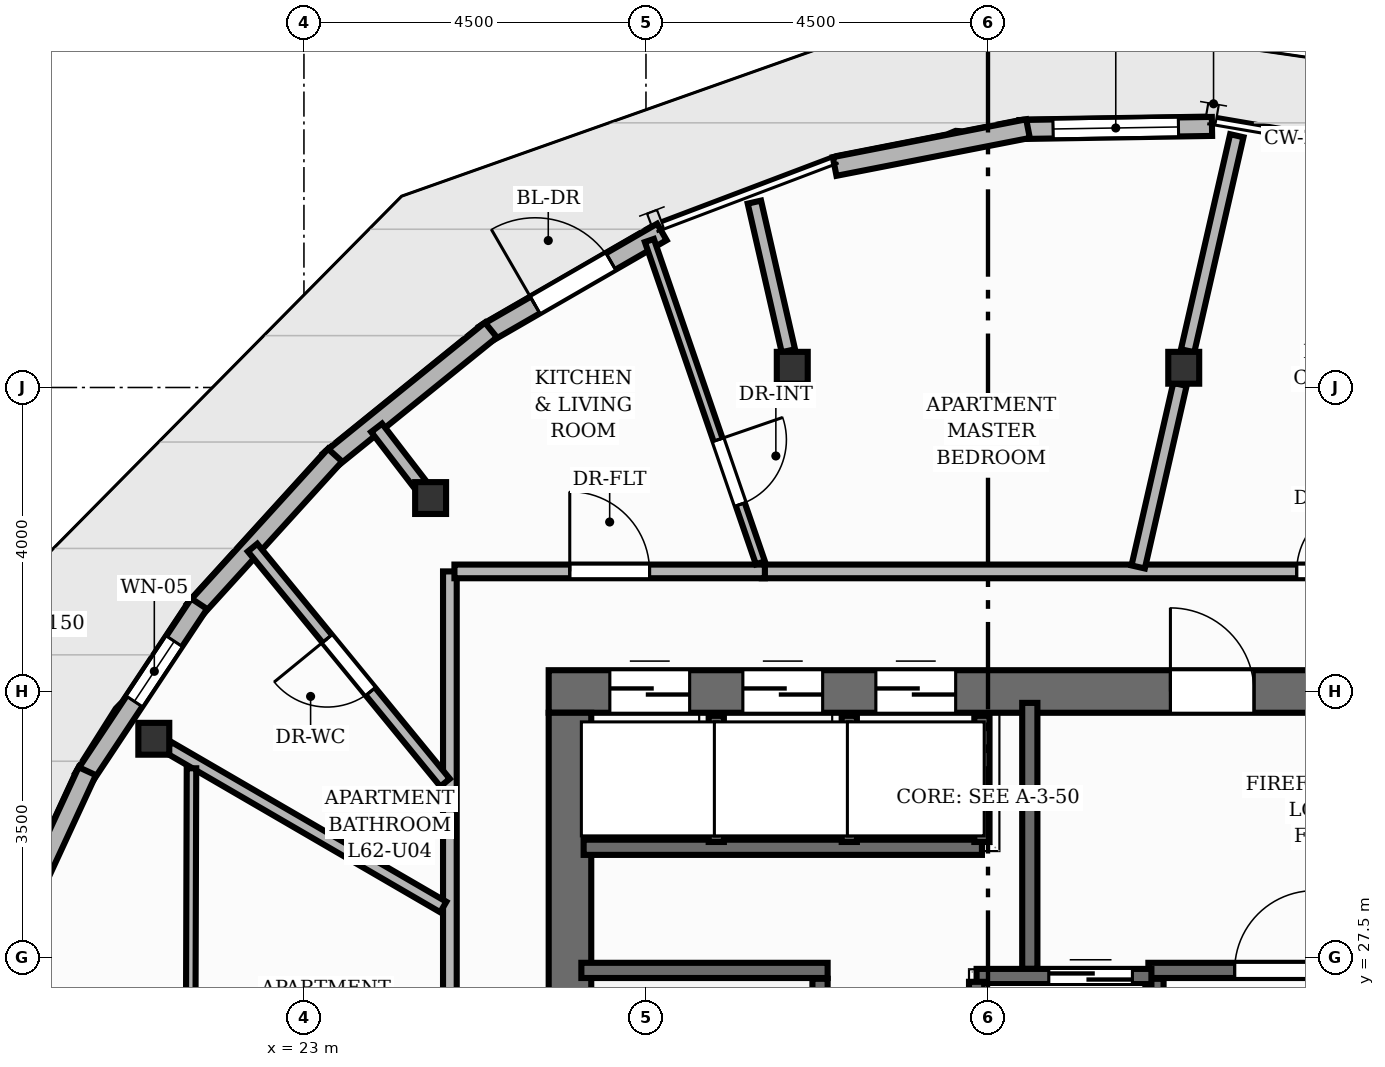
"""IFC4 building model, lengths in metres.
Left out: names, types, materials, properties, quantities, classifications, styles, units other than length and angle.
Written with IfcOpenShell. Run it as: python <this file> out.ifc"""

import sys

from ifc_helpers import new_model, si_unit, direction, frame, frame_2d, origin, origin_2d, place, context, subcontext, project, spatial, rectangle, i_section, extrude, element, fill, save


model = new_model("IFC4")
c1 = context("Model", 3, precision=1e-05, world=origin(), true_north=direction((0.0, 1.0)))
c2 = subcontext(c1, "Body", "Model", "MODEL_VIEW")
j1 = project(units=[si_unit("LENGTHUNIT", "METRE"), si_unit("PLANEANGLEUNIT", "RADIAN")], contexts=[c1])
p1 = place(None, origin())
s1 = spatial("IfcSite", under=j1, at=p1, CompositionType="ELEMENT")
p2 = place(p1, origin())
s2 = spatial("IfcBuilding", under=s1, at=p2, CompositionType="ELEMENT")
p3 = place(p2, frame((0.0, 0.0, 207.84)))
s3 = spatial("IfcBuildingStorey", under=s2, at=p3, CompositionType="ELEMENT", Elevation=207.84)
p4 = place(p3, frame((26.22, 31.0, 0.0), z_axis=(0.0, 0.0, 1.0), x_axis=(1.0, 0.0, 0.0)))
e1 = element("IfcWall", 1, at=p4, inside=s3, PredefinedType="SHEAR", context=c2, shape_type="SweptSolid", body=[
    extrude(rectangle(XDim=11.56, YDim=0.56, at=frame_2d((5.78, 0.0))), origin(), (0.0, 0.0, 1.0), 3.2),
])
p5 = place(p4, frame((8.18, 0.0, 0.0)))
e2 = element("IfcOpeningElement", 2, at=p5, cuts=e1, PredefinedType="OPENING", context=c2, shape_type="SweptSolid", body=[
    extrude(rectangle(XDim=1.1, YDim=2.15, at=frame_2d((0.55, 1.075))), frame((0.0, 0.29, 0.0), z_axis=(0.0, -1.0, 0.0), x_axis=(1.0, 0.0, 0.0)), (0.0, 0.0, 1.0), 0.58),
])
p6 = place(p4, frame((0.805, 0.0, 0.0)))
e3 = element("IfcOpeningElement", 3, at=p6, cuts=e1, PredefinedType="OPENING", context=c2, shape_type="SweptSolid", body=[
    extrude(rectangle(XDim=1.05, YDim=2.15, at=frame_2d((0.525, 1.075))), frame((0.0, 0.29, 0.0), z_axis=(0.0, -1.0, 0.0), x_axis=(1.0, 0.0, 0.0)), (0.0, 0.0, 1.0), 0.58),
])
p7 = place(p4, frame((2.555, 0.0, 0.0)))
e4 = element("IfcOpeningElement", 4, at=p7, cuts=e1, PredefinedType="OPENING", context=c2, shape_type="SweptSolid", body=[
    extrude(rectangle(XDim=1.05, YDim=2.15, at=frame_2d((0.525, 1.075))), frame((0.0, 0.29, 0.0), z_axis=(0.0, -1.0, 0.0), x_axis=(1.0, 0.0, 0.0)), (0.0, 0.0, 1.0), 0.58),
])
p8 = place(p4, frame((4.305, 0.0, 0.0)))
e5 = element("IfcOpeningElement", 5, at=p8, cuts=e1, PredefinedType="OPENING", context=c2, shape_type="SweptSolid", body=[
    extrude(rectangle(XDim=1.05, YDim=2.15, at=frame_2d((0.525, 1.075))), frame((0.0, 0.29, 0.0), z_axis=(0.0, -1.0, 0.0), x_axis=(1.0, 0.0, 0.0)), (0.0, 0.0, 1.0), 0.58),
])
p9 = place(p3, frame((26.5, 17.28, 0.0), z_axis=(0.0, 0.0, 1.0), x_axis=(0.0, 1.0, 0.0)))
e6 = element("IfcWall", 6, at=p9, inside=s3, PredefinedType="SHEAR", context=c2, shape_type="SweptSolid", body=[
    extrude(rectangle(XDim=13.44, YDim=0.56, at=frame_2d((6.72, 0.0))), origin(), (0.0, 0.0, 1.0), 3.2),
])
for number, where, z_axis, x_axis in (
    (7, (34.575, 35.26, 0.0), (0.0, 0.0, 1.0), (1.0, 0.0, 0.0)),
    (8, (29.425, 35.26, 0.0), (0.0, 0.0, 1.0), (1.0, 0.0, 0.0)),
    (9, (24.667, 33.545, 0.0), (0.0, 0.0, 1.0), (1.0, 0.0, 0.0)),
    (10, (21.025, 30.378, 0.0), (0.0, 0.0, 1.0), (1.0, 0.0, 0.0)),
):
    element("IfcColumn", number, at=place(p3, frame(where, z_axis=z_axis, x_axis=x_axis)), inside=s3, PredefinedType="COLUMN", context=c2, shape_type="SweptSolid", body=[
        extrude(i_section(OverallWidth=0.407, OverallDepth=0.419, WebThickness=0.031, FlangeThickness=0.049, at=origin_2d()), origin(), (0.0, 0.0, 1.0), 3.2),
    ])
p10 = place(p3, frame((32.415, 38.394, 0.0), z_axis=(0.0, 0.0, 1.0), x_axis=(0.999868796453, 0.016198453019, 0.0)))
e11 = element("IfcWall", 11, at=p10, inside=s3, PredefinedType="SOLIDWALL", context=c2, shape_type="SweptSolid", body=[
    extrude(rectangle(XDim=2.532, YDim=0.25, at=frame_2d((1.266, 0.0))), origin(), (0.0, 0.0, 1.0), 2.96),
])
p11 = place(p10, frame((0.441, 0.0, 0.85)))
e12 = element("IfcOpeningElement", 12, at=p11, cuts=e11, PredefinedType="OPENING", context=c2, shape_type="SweptSolid", body=[
    extrude(rectangle(XDim=1.65, YDim=1.55, at=frame_2d((0.825, 0.775))), frame((0.0, 0.135, 0.0), z_axis=(0.0, -1.0, 0.0), x_axis=(1.0, 0.0, 0.0)), (0.0, 0.0, 1.0), 0.27),
])
p12 = place(p3, frame((29.982, 37.908, 0.0), z_axis=(0.0, 0.0, 1.0), x_axis=(0.981387252987, 0.1920392139, 0.0)))
e13 = element("IfcWall", 13, at=p12, inside=s3, PredefinedType="SOLIDWALL", context=c2, shape_type="SweptSolid", body=[
    extrude(rectangle(XDim=2.592, YDim=0.25, at=frame_2d((1.296, 0.0))), origin(), (0.0, 0.0, 1.0), 2.96),
])
p13 = place(p3, frame((25.37, 35.695, 0.0), z_axis=(0.0, 0.0, 1.0), x_axis=(0.865914653104, 0.500191776762, 0.0)))
e14 = element("IfcWall", 14, at=p13, inside=s3, PredefinedType="SOLIDWALL", context=c2, shape_type="SweptSolid", body=[
    extrude(rectangle(XDim=2.702, YDim=0.25, at=frame_2d((1.351, 0.0))), origin(), (0.0, 0.0, 1.0), 2.96),
])
p14 = place(p13, frame((0.776, 0.0, 0.0)))
e15 = element("IfcOpeningElement", 15, at=p14, cuts=e14, PredefinedType="OPENING", context=c2, shape_type="SweptSolid", body=[
    extrude(rectangle(XDim=1.15, YDim=2.2, at=frame_2d((0.575, 1.1))), frame((0.0, 0.135, 0.0), z_axis=(0.0, -1.0, 0.0), x_axis=(1.0, 0.0, 0.0)), (0.0, 0.0, 1.0), 0.27),
])
p15 = place(p3, frame((23.33, 34.035, 0.0), z_axis=(0.0, 0.0, 1.0), x_axis=(0.777535429671, 0.628839133329, 0.0)))
e16 = element("IfcWall", 16, at=p15, inside=s3, PredefinedType="SOLIDWALL", context=c2, shape_type="SweptSolid", body=[
    extrude(rectangle(XDim=2.739, YDim=0.25, at=frame_2d((1.369, 0.0))), origin(), (0.0, 0.0, 1.0), 2.96),
])
p16 = place(p3, frame((21.554, 32.069, 0.0), z_axis=(0.0, 0.0, 1.0), x_axis=(0.672668387979, 0.739944078842, 0.0)))
e17 = element("IfcWall", 17, at=p16, inside=s3, PredefinedType="SOLIDWALL", context=c2, shape_type="SweptSolid", body=[
    extrude(rectangle(XDim=2.758, YDim=0.25, at=frame_2d((1.379, 0.0))), origin(), (0.0, 0.0, 1.0), 2.96),
])
p17 = place(p3, frame((20.096, 29.856, 0.0), z_axis=(0.0, 0.0, 1.0), x_axis=(0.553003487622, 0.83317893797, 0.0)))
e18 = element("IfcWall", 18, at=p17, inside=s3, PredefinedType="SOLIDWALL", context=c2, shape_type="SweptSolid", body=[
    extrude(rectangle(XDim=2.758, YDim=0.25, at=frame_2d((1.379, 0.0))), origin(), (0.0, 0.0, 1.0), 2.96),
])
p18 = place(p17, frame((1.216, 0.0, 0.85)))
e19 = element("IfcOpeningElement", 19, at=p18, cuts=e18, PredefinedType="OPENING", context=c2, shape_type="SweptSolid", body=[
    extrude(rectangle(XDim=0.95, YDim=1.45, at=frame_2d((0.475, 0.725))), frame((0.0, 0.135, 0.0), z_axis=(0.0, -1.0, 0.0), x_axis=(1.0, 0.0, 0.0)), (0.0, 0.0, 1.0), 0.27),
])
p19 = place(p3, frame((19.0, 27.466, 0.0), z_axis=(0.0, 0.0, 1.0), x_axis=(0.419544316157, 0.907734854889, 0.0)))
e20 = element("IfcWall", 20, at=p19, inside=s3, PredefinedType="SOLIDWALL", context=c2, shape_type="SweptSolid", body=[
    extrude(rectangle(XDim=2.739, YDim=0.25, at=frame_2d((1.369, 0.0))), origin(), (0.0, 0.0, 1.0), 2.96),
])
p20 = place(p3, frame((29.79, 20.78, 0.0), z_axis=(0.0, 0.0, 1.0), x_axis=(0.0, 1.0, 0.0)))
e21 = element("IfcWall", 21, at=p20, inside=s3, PredefinedType="SHEAR", context=c2, shape_type="SweptSolid", body=[
    extrude(rectangle(XDim=6.44, YDim=0.2, at=frame_2d((3.22, 0.0))), origin(), (0.0, 0.0, 1.0), 3.2),
])
p21 = place(p3, frame((26.65, 27.33, 0.0), z_axis=(0.0, 0.0, 1.0), x_axis=(1.0, 0.0, 0.0)))
e22 = element("IfcWall", 22, at=p21, inside=s3, PredefinedType="SHEAR", context=c2, shape_type="SweptSolid", body=[
    extrude(rectangle(XDim=3.24, YDim=0.2, at=frame_2d((1.62, 0.0))), origin(), (0.0, 0.0, 1.0), 3.2),
])
p22 = place(p3, frame((34.21, 20.78, 0.0), z_axis=(0.0, 0.0, 1.0), x_axis=(0.0, 1.0, 0.0)))
e23 = element("IfcWall", 23, at=p22, inside=s3, PredefinedType="SHEAR", context=c2, shape_type="SweptSolid", body=[
    extrude(rectangle(XDim=6.44, YDim=0.2, at=frame_2d((3.22, 0.0))), origin(), (0.0, 0.0, 1.0), 3.2),
])
p23 = place(p3, frame((34.11, 27.33, 0.0), z_axis=(0.0, 0.0, 1.0), x_axis=(1.0, 0.0, 0.0)))
e24 = element("IfcWall", 24, at=p23, inside=s3, PredefinedType="SHEAR", context=c2, shape_type="SweptSolid", body=[
    extrude(rectangle(XDim=3.24, YDim=0.2, at=frame_2d((1.62, 0.0))), origin(), (0.0, 0.0, 1.0), 3.2),
])
p24 = place(p23, frame((1.135, 0.0, 0.0)))
e25 = element("IfcOpeningElement", 25, at=p24, cuts=e24, PredefinedType="OPENING", context=c2, shape_type="SweptSolid", body=[
    extrude(rectangle(XDim=1.05, YDim=2.15, at=frame_2d((0.525, 1.075))), frame((0.0, 0.11, 0.0), z_axis=(0.0, -1.0, 0.0), x_axis=(1.0, 0.0, 0.0)), (0.0, 0.0, 1.0), 0.22),
])
p25 = place(p3, frame((32.55, 27.35, 0.0), z_axis=(0.0, 0.0, 1.0), x_axis=(0.0, 1.0, 0.0)))
e26 = element("IfcWall", 26, at=p25, inside=s3, PredefinedType="SHEAR", context=c2, shape_type="SweptSolid", body=[
    extrude(rectangle(XDim=3.5, YDim=0.2, at=frame_2d((1.75, 0.0))), origin(), (0.0, 0.0, 1.0), 3.2),
])
p26 = place(p3, frame((31.85, 27.25, 0.0), z_axis=(0.0, 0.0, 1.0), x_axis=(1.0, 0.0, 0.0)))
e27 = element("IfcWall", 27, at=p26, inside=s3, PredefinedType="SHEAR", context=c2, shape_type="SweptSolid", body=[
    extrude(rectangle(XDim=2.3, YDim=0.2, at=frame_2d((1.15, 0.0))), origin(), (0.0, 0.0, 1.0), 3.2),
])
p27 = place(p26, frame((0.95, 0.0, 0.0)))
e28 = element("IfcOpeningElement", 28, at=p27, cuts=e27, PredefinedType="OPENING", context=c2, shape_type="SweptSolid", body=[
    extrude(rectangle(XDim=1.1, YDim=2.15, at=frame_2d((0.55, 1.075))), frame((0.0, 0.11, 0.0), z_axis=(0.0, -1.0, 0.0), x_axis=(1.0, 0.0, 0.0)), (0.0, 0.0, 1.0), 0.22),
])
p28 = place(p3, frame((31.85, 25.47, 0.0), z_axis=(0.0, 0.0, 1.0), x_axis=(0.0, 1.0, 0.0)))
e29 = element("IfcWall", 29, at=p28, inside=s3, PredefinedType="SHEAR", context=c2, shape_type="SweptSolid", body=[
    extrude(rectangle(XDim=1.71, YDim=0.2, at=frame_2d((0.855, 0.0))), origin(), (0.0, 0.0, 1.0), 3.2),
])
p29 = place(p3, frame((26.68, 28.95, 0.0), z_axis=(0.0, 0.0, 1.0), x_axis=(1.0, 0.0, 0.0)))
e30 = element("IfcWall", 30, at=p29, inside=s3, PredefinedType="SHEAR", context=c2, shape_type="SweptSolid", body=[
    extrude(rectangle(XDim=5.24, YDim=0.2, at=frame_2d((2.62, 0.0))), origin(), (0.0, 0.0, 1.0), 3.2),
])
for number, where, z_axis, x_axis in (
    (31, (31.92, 29.02, 0.0), (0.0, 0.0, 1.0), (0.0, 1.0, 0.0)),
    (32, (28.425, 29.02, 0.0), (0.0, 0.0, 1.0), (0.0, 1.0, 0.0)),
    (33, (30.175, 29.02, 0.0), (0.0, 0.0, 1.0), (0.0, 1.0, 0.0)),
):
    element("IfcWall", number, at=place(p3, frame(where, z_axis=z_axis, x_axis=x_axis)), inside=s3, PredefinedType="SHEAR", context=c2, shape_type="SweptSolid", body=[
        extrude(rectangle(XDim=1.66, YDim=0.2, at=frame_2d((0.83, 0.0))), origin(), (0.0, 0.0, 1.0), 3.2),
    ])
p30 = place(p3, frame((34.626, 35.483, 0.0), z_axis=(0.0, 0.0, 1.0), x_axis=(0.22289331625, 0.974842843525, 0.0)))
e34 = element("IfcWall", 34, at=p30, inside=s3, PredefinedType="PARTITIONING", context=c2, shape_type="SweptSolid", body=[
    extrude(rectangle(XDim=2.903, YDim=0.18, at=frame_2d((1.451, 0.0))), origin(), (0.0, 0.0, 1.0), 2.403),
])
p31 = place(p3, frame((29.374, 35.483, 0.0), z_axis=(0.0, 0.0, 1.0), x_axis=(-0.222930532859, 0.974834333371, 0.0)))
e35 = element("IfcWall", 35, at=p31, inside=s3, PredefinedType="PARTITIONING", context=c2, shape_type="SweptSolid", body=[
    extrude(rectangle(XDim=2.006, YDim=0.18, at=frame_2d((1.003, 0.0))), origin(), (0.0, 0.0, 1.0), 2.403),
])
p32 = place(p3, frame((24.527, 33.727, 0.0), z_axis=(0.0, 0.0, 1.0), x_axis=(-0.609219316709, 0.793001780672, 0.0)))
e36 = element("IfcWall", 36, at=p32, inside=s3, PredefinedType="PARTITIONING", context=c2, shape_type="SweptSolid", body=[
    extrude(rectangle(XDim=0.937, YDim=0.18, at=frame_2d((0.468, 0.0))), origin(), (0.0, 0.0, 1.0), 2.403),
])
p33 = place(p3, frame((29.023, 32.58, 0.0), z_axis=(0.0, 0.0, 1.0), x_axis=(1.0, 0.0, 0.0)))
e37 = element("IfcWall", 37, at=p33, inside=s3, PredefinedType="PARTITIONING", context=c2, shape_type="SweptSolid", body=[
    extrude(rectangle(XDim=10.057, YDim=0.18, at=frame_2d((5.028, 0.0))), origin(), (0.0, 0.0, 1.0), 2.955),
])
p34 = place(p33, frame((7.038, 0.0, 0.0)))
e38 = element("IfcOpeningElement", 38, at=p34, cuts=e37, PredefinedType="OPENING", context=c2, shape_type="SweptSolid", body=[
    extrude(rectangle(XDim=0.9, YDim=2.1, at=frame_2d((0.45, 1.05))), frame((0.0, 0.1, 0.0), z_axis=(0.0, -1.0, 0.0), x_axis=(1.0, 0.0, 0.0)), (0.0, 0.0, 1.0), 0.2),
])
p35 = place(p3, frame((24.92, 20.574, 0.0), z_axis=(0.0, 0.0, 1.0), x_axis=(0.0, 1.0, 0.0)))
e39 = element("IfcWall", 39, at=p35, inside=s3, PredefinedType="PARTITIONING", context=c2, shape_type="SweptSolid", body=[
    extrude(rectangle(XDim=12.006, YDim=0.18, at=frame_2d((6.003, 0.0))), origin(), (0.0, 0.0, 1.0), 2.955),
])
p36 = place(p3, frame((24.98, 32.58, 0.0), z_axis=(0.0, 0.0, 1.0), x_axis=(1.0, 0.0, 0.0)))
e40 = element("IfcWall", 40, at=p36, inside=s3, PredefinedType="PARTITIONING", context=c2, shape_type="SweptSolid", body=[
    extrude(rectangle(XDim=4.085, YDim=0.18, at=frame_2d((2.042, 0.0))), origin(), (0.0, 0.0, 1.0), 2.955),
])
p37 = place(p36, frame((1.517, 0.0, 0.0)))
e41 = element("IfcOpeningElement", 41, at=p37, cuts=e40, PredefinedType="OPENING", context=c2, shape_type="SweptSolid", body=[
    extrude(rectangle(XDim=1.05, YDim=2.15, at=frame_2d((0.525, 1.075))), frame((0.0, 0.1, 0.0), z_axis=(0.0, -1.0, 0.0), x_axis=(1.0, 0.0, 0.0)), (0.0, 0.0, 1.0), 0.2),
])
p38 = place(p3, frame((33.976, 32.638, 0.0), z_axis=(0.0, 0.0, 1.0), x_axis=(0.222927030412, 0.974835134323, 0.0)))
e42 = element("IfcWall", 42, at=p38, inside=s3, PredefinedType="PARTITIONING", context=c2, shape_type="SweptSolid", body=[
    extrude(rectangle(XDim=2.464, YDim=0.18, at=frame_2d((1.232, 0.0))), origin(), (0.0, 0.0, 1.0), 2.403),
])
p39 = place(p3, frame((24.857, 29.801, 0.0), z_axis=(0.0, 0.0, 1.0), x_axis=(-0.63363022253, 0.773636052092, 0.0)))
e43 = element("IfcWall", 43, at=p39, inside=s3, PredefinedType="PLUMBINGWALL", context=c2, shape_type="SweptSolid", body=[
    extrude(rectangle(XDim=3.997, YDim=0.16, at=frame_2d((1.999, 0.0))), origin(), (0.0, 0.0, 1.0), 2.955),
])
p40 = place(p39, frame((1.548, 0.0, 0.0)))
e44 = element("IfcOpeningElement", 44, at=p40, cuts=e43, PredefinedType="OPENING", context=c2, shape_type="SweptSolid", body=[
    extrude(rectangle(XDim=0.9, YDim=2.1, at=frame_2d((0.45, 1.05))), frame((0.0, 0.09, 0.0), z_axis=(0.0, -1.0, 0.0), x_axis=(1.0, 0.0, 0.0)), (0.0, 0.0, 1.0), 0.18),
])
p41 = place(p3, frame((27.545, 36.934, 0.0), z_axis=(0.0, 0.0, 1.0), x_axis=(0.325683667498, -0.945478793377, 0.0)))
e45 = element("IfcWall", 45, at=p41, inside=s3, PredefinedType="PARTITIONING", context=c2, shape_type="SweptSolid", body=[
    extrude(rectangle(XDim=4.485, YDim=0.125, at=frame_2d((2.243, 0.0))), origin(), (0.0, 0.0, 1.0), 2.955),
])
p42 = place(p41, frame((2.773, 0.0, 0.0)))
e46 = element("IfcOpeningElement", 46, at=p42, cuts=e45, PredefinedType="OPENING", context=c2, shape_type="SweptSolid", body=[
    extrude(rectangle(XDim=0.9, YDim=2.1, at=frame_2d((0.45, 1.05))), frame((0.0, 0.073, 0.0), z_axis=(0.0, -1.0, 0.0), x_axis=(1.0, 0.0, 0.0)), (0.0, 0.0, 1.0), 0.145),
])
p43 = place(p3, frame((24.833, 28.164, 0.0), z_axis=(0.0, 0.0, 1.0), x_axis=(-0.864609810713, 0.502443902559, 0.0)))
e47 = element("IfcWall", 47, at=p43, inside=s3, PredefinedType="PLUMBINGWALL", context=c2, shape_type="SweptSolid", body=[
    extrude(rectangle(XDim=4.182, YDim=0.16, at=frame_2d((2.091, 0.0))), origin(), (0.0, 0.0, 1.0), 2.403),
])
p44 = place(p3, frame((21.487, 19.045, 0.0), z_axis=(0.0, 0.0, 1.0), x_axis=(0.003056179539, 0.999995329872, 0.0)))
e48 = element("IfcWall", 48, at=p44, inside=s3, PredefinedType="PARTITIONING", context=c2, shape_type="SweptSolid", body=[
    extrude(rectangle(XDim=10.944, YDim=0.125, at=frame_2d((5.472, 0.0))), origin(), (0.0, 0.0, 1.0), 2.955),
])
p45 = place(p44, frame((5.022, 0.0, 0.0)))
e49 = element("IfcOpeningElement", 49, at=p45, cuts=e48, PredefinedType="OPENING", context=c2, shape_type="SweptSolid", body=[
    extrude(rectangle(XDim=0.9, YDim=2.1, at=frame_2d((0.45, 1.05))), frame((0.0, 0.073, 0.0), z_axis=(0.0, -1.0, 0.0), x_axis=(1.0, 0.0, 0.0)), (0.0, 0.0, 1.0), 0.145),
])
p46 = place(p14, origin())
e50 = element("IfcDoor", 50, at=p46, inside=s3, OperationType="SINGLE_SWING_LEFT", PredefinedType="DOOR", context=c2, shape_type="SweptSolid", body=[
    extrude(rectangle(XDim=1.15, YDim=2.2, at=frame_2d((0.575, 1.1))), frame((0.0, 0.025, 0.0), z_axis=(0.0, -1.0, 0.0), x_axis=(1.0, 0.0, 0.0)), (0.0, 0.0, 1.0), 0.05),
])
fill(e15, e50)
p47 = place(p11, origin())
e51 = element("IfcWindow", 51, at=p47, inside=s3, PartitioningType="SINGLE_PANEL", PredefinedType="WINDOW", context=c2, shape_type="SweptSolid", body=[
    extrude(rectangle(XDim=1.65, YDim=1.55, at=frame_2d((0.825, 0.775))), frame((0.0, 0.03, 0.0), z_axis=(0.0, -1.0, 0.0), x_axis=(1.0, 0.0, 0.0)), (0.0, 0.0, 1.0), 0.06),
])
fill(e12, e51)
p48 = place(p18, origin())
e52 = element("IfcWindow", 52, at=p48, inside=s3, PartitioningType="SINGLE_PANEL", PredefinedType="WINDOW", context=c2, shape_type="SweptSolid", body=[
    extrude(rectangle(XDim=0.95, YDim=1.45, at=frame_2d((0.475, 0.725))), frame((0.0, 0.03, 0.0), z_axis=(0.0, -1.0, 0.0), x_axis=(1.0, 0.0, 0.0)), (0.0, 0.0, 1.0), 0.06),
])
fill(e19, e52)
p49 = place(p24, origin())
e53 = element("IfcDoor", 53, at=p49, inside=s3, OperationType="SINGLE_SWING_RIGHT", PredefinedType="DOOR", context=c2, shape_type="SweptSolid", body=[
    extrude(rectangle(XDim=1.05, YDim=2.15, at=frame_2d((0.525, 1.075))), frame((0.0, 0.025, 0.0), z_axis=(0.0, -1.0, 0.0), x_axis=(1.0, 0.0, 0.0)), (0.0, 0.0, 1.0), 0.05),
])
fill(e25, e53)
p50 = place(p5, origin())
e54 = element("IfcDoor", 54, at=p50, inside=s3, OperationType="SINGLE_SWING_LEFT", PredefinedType="DOOR", context=c2, shape_type="SweptSolid", body=[
    extrude(rectangle(XDim=1.1, YDim=2.15, at=frame_2d((0.55, 1.075))), frame((0.0, 0.025, 0.0), z_axis=(0.0, -1.0, 0.0), x_axis=(1.0, 0.0, 0.0)), (0.0, 0.0, 1.0), 0.05),
])
fill(e2, e54)
p51 = place(p27, origin())
e55 = element("IfcDoor", 55, at=p51, inside=s3, OperationType="DOUBLE_DOOR_SLIDING", PredefinedType="DOOR", context=c2, shape_type="SweptSolid", body=[
    extrude(rectangle(XDim=1.1, YDim=2.15, at=frame_2d((0.55, 1.075))), frame((0.0, 0.025, 0.0), z_axis=(0.0, -1.0, 0.0), x_axis=(1.0, 0.0, 0.0)), (0.0, 0.0, 1.0), 0.05),
])
fill(e28, e55)
p52 = place(p6, origin())
e56 = element("IfcDoor", 56, at=p52, inside=s3, OperationType="DOUBLE_DOOR_SLIDING", PredefinedType="DOOR", context=c2, shape_type="SweptSolid", body=[
    extrude(rectangle(XDim=1.05, YDim=2.15, at=frame_2d((0.525, 1.075))), frame((0.0, 0.025, 0.0), z_axis=(0.0, -1.0, 0.0), x_axis=(1.0, 0.0, 0.0)), (0.0, 0.0, 1.0), 0.05),
])
fill(e3, e56)
p53 = place(p7, origin())
e57 = element("IfcDoor", 57, at=p53, inside=s3, OperationType="DOUBLE_DOOR_SLIDING", PredefinedType="DOOR", context=c2, shape_type="SweptSolid", body=[
    extrude(rectangle(XDim=1.05, YDim=2.15, at=frame_2d((0.525, 1.075))), frame((0.0, 0.025, 0.0), z_axis=(0.0, -1.0, 0.0), x_axis=(1.0, 0.0, 0.0)), (0.0, 0.0, 1.0), 0.05),
])
fill(e4, e57)
p54 = place(p8, origin())
e58 = element("IfcDoor", 58, at=p54, inside=s3, OperationType="DOUBLE_DOOR_SLIDING", PredefinedType="DOOR", context=c2, shape_type="SweptSolid", body=[
    extrude(rectangle(XDim=1.05, YDim=2.15, at=frame_2d((0.525, 1.075))), frame((0.0, 0.025, 0.0), z_axis=(0.0, -1.0, 0.0), x_axis=(1.0, 0.0, 0.0)), (0.0, 0.0, 1.0), 0.05),
])
fill(e5, e58)
p55 = place(p34, origin())
e59 = element("IfcDoor", 59, at=p55, inside=s3, OperationType="SINGLE_SWING_RIGHT", PredefinedType="DOOR", context=c2, shape_type="SweptSolid", body=[
    extrude(rectangle(XDim=0.9, YDim=2.1, at=frame_2d((0.45, 1.05))), frame((0.0, 0.025, 0.0), z_axis=(0.0, -1.0, 0.0), x_axis=(1.0, 0.0, 0.0)), (0.0, 0.0, 1.0), 0.05),
])
fill(e38, e59)
p56 = place(p37, origin())
e60 = element("IfcDoor", 60, at=p56, inside=s3, OperationType="SINGLE_SWING_LEFT", PredefinedType="DOOR", context=c2, shape_type="SweptSolid", body=[
    extrude(rectangle(XDim=1.05, YDim=2.15, at=frame_2d((0.525, 1.075))), frame((0.0, 0.025, 0.0), z_axis=(0.0, -1.0, 0.0), x_axis=(1.0, 0.0, 0.0)), (0.0, 0.0, 1.0), 0.05),
])
fill(e41, e60)
p57 = place(p40, origin())
e61 = element("IfcDoor", 61, at=p57, inside=s3, OperationType="SINGLE_SWING_RIGHT", PredefinedType="DOOR", context=c2, shape_type="SweptSolid", body=[
    extrude(rectangle(XDim=0.9, YDim=2.1, at=frame_2d((0.45, 1.05))), frame((0.0, 0.025, 0.0), z_axis=(0.0, -1.0, 0.0), x_axis=(1.0, 0.0, 0.0)), (0.0, 0.0, 1.0), 0.05),
])
fill(e44, e61)
p58 = place(p42, origin())
e62 = element("IfcDoor", 62, at=p58, inside=s3, OperationType="SINGLE_SWING_LEFT", PredefinedType="DOOR", context=c2, shape_type="SweptSolid", body=[
    extrude(rectangle(XDim=0.9, YDim=2.1, at=frame_2d((0.45, 1.05))), frame((0.0, 0.025, 0.0), z_axis=(0.0, -1.0, 0.0), x_axis=(1.0, 0.0, 0.0)), (0.0, 0.0, 1.0), 0.05),
])
fill(e46, e62)
save(model, sys.argv[1])
